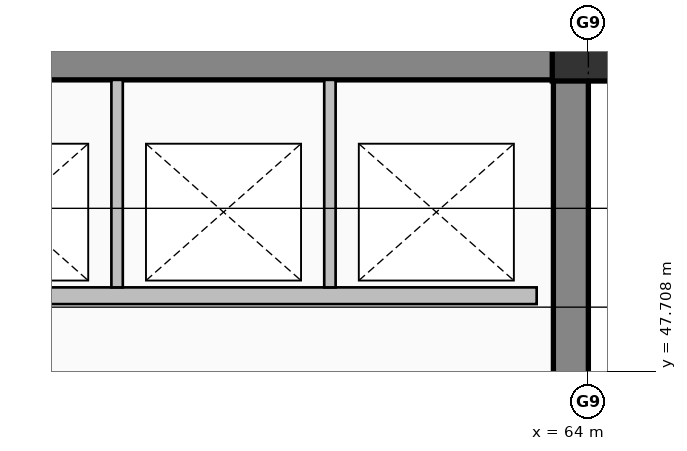
"""IFC4 building model, lengths in metres.
Left out: names, types, materials, properties, quantities, classifications, styles, units other than length and angle.
Written with IfcOpenShell. Run it as: python <this file> out.ifc"""

import sys

from ifc_helpers import new_model, si_unit, direction, frame, frame_2d, origin, origin_2d, place, context, subcontext, project, spatial, rectangle, hollow_rectangle, extrude, element, save


model = new_model("IFC4")
c1 = context("Model", 3, precision=1e-05, world=origin(), true_north=direction((0.0, 1.0)))
c2 = subcontext(c1, "Body", "Model", "MODEL_VIEW")
j1 = project(units=[si_unit("LENGTHUNIT", "METRE"), si_unit("PLANEANGLEUNIT", "RADIAN")], contexts=[c1])
p1 = place(None, origin())
s1 = spatial("IfcSite", under=j1, at=p1, CompositionType="ELEMENT")
p2 = place(p1, origin())
s2 = spatial("IfcBuilding", under=s1, at=p2, CompositionType="ELEMENT")
p3 = place(p2, frame((0.0, 0.0, 241.8)))
s3 = spatial("IfcBuildingStorey", under=s2, at=p3, CompositionType="ELEMENT", Elevation=241.8)
p4 = place(p3, frame((40.5, 51.77, 0.0), z_axis=(0.0, 0.0, 1.0), x_axis=(1.0, 0.0, 0.0)))
e1 = element("IfcWall", 1, at=p4, inside=s3, PredefinedType="SHEAR", context=c2, shape_type="SweptSolid", body=[
    extrude(rectangle(XDim=23.5, YDim=0.46, at=frame_2d((11.75, 0.0))), origin(), (0.0, 0.0, 1.0), 3.775),
])
p5 = place(p3, frame((63.77, 36.32, 0.0), z_axis=(0.0, 0.0, 1.0), x_axis=(0.0, 1.0, 0.0)))
e2 = element("IfcWall", 2, at=p5, inside=s3, PredefinedType="SHEAR", context=c2, shape_type="SweptSolid", body=[
    extrude(rectangle(XDim=15.22, YDim=0.46, at=frame_2d((7.61, 0.0))), origin(), (0.0, 0.0, 1.0), 3.775),
])
p6 = place(p3, frame((64.0, 52.0, 0.0), z_axis=(0.0, 0.0, 1.0), x_axis=(1.0, 0.0, 0.0)))
e3 = element("IfcColumn", 3, at=p6, inside=s3, PredefinedType="COLUMN", context=c2, shape_type="SweptSolid", body=[
    extrude(hollow_rectangle(XDim=0.95, YDim=0.95, WallThickness=0.036, at=origin_2d()), origin(), (0.0, 0.0, 1.0), 4.0),
])
p7 = place(p3, frame((63.32, 48.7, 0.0), z_axis=(0.0, 0.0, 1.0), x_axis=(-1.0, 0.0, 0.0)))
e4 = element("IfcWall", 4, at=p7, inside=s3, PredefinedType="PARTITIONING", context=c2, shape_type="SweptSolid", body=[
    extrude(rectangle(XDim=8.24, YDim=0.22, at=frame_2d((4.12, 0.0))), origin(), (0.0, 0.0, 1.0), 3.775),
])
for number, where, z_axis, x_axis in (
    (5, (57.8, 48.81, 0.0), (0.0, 0.0, 1.0), (0.0, 1.0, 0.0)),
    (6, (60.6, 48.81, 0.0), (0.0, 0.0, 1.0), (0.0, 1.0, 0.0)),
):
    element("IfcWall", number, at=place(p3, frame(where, z_axis=z_axis, x_axis=x_axis)), inside=s3, PredefinedType="PARTITIONING", context=c2, shape_type="SweptSolid", body=[
        extrude(rectangle(XDim=2.73, YDim=0.15, at=frame_2d((1.365, 0.0))), origin(), (0.0, 0.0, 1.0), 3.775),
    ])
save(model, sys.argv[1])
